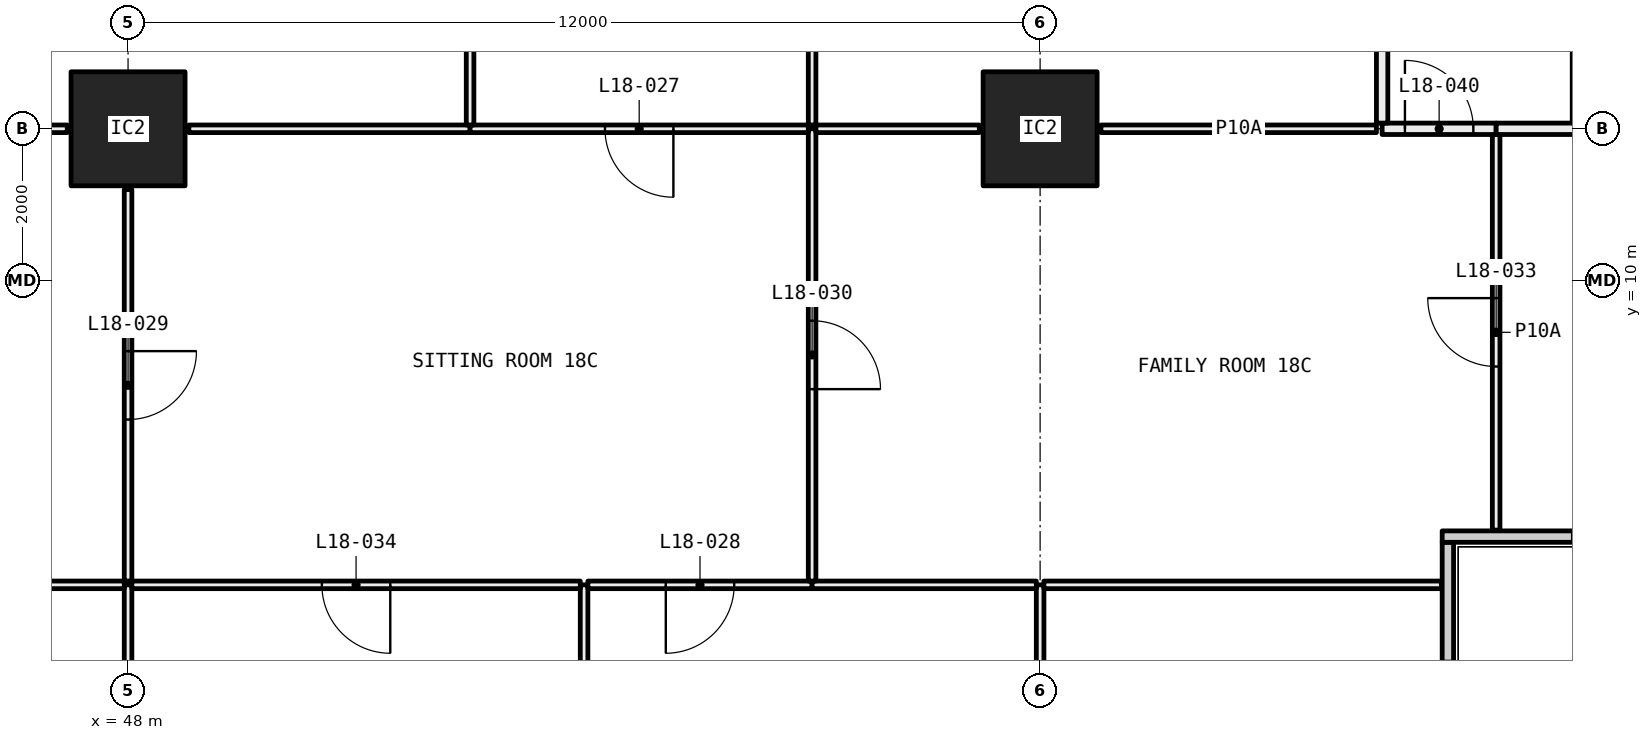
"""IFC4 building model, lengths in metres.
Left out: names, types, materials, properties, quantities, classifications, styles, units other than length and angle.
Written with IfcOpenShell. Run it as: python <this file> out.ifc"""

import sys

from ifc_helpers import new_model, si_unit, direction, frame, frame_2d, origin, origin_2d, place, context, subcontext, project, spatial, rectangle, hollow_rectangle, extrude, element, fill, save


model = new_model("IFC4")
c1 = context("Model", 3, precision=1e-05, world=origin(), true_north=direction((0.0, 1.0)))
c2 = subcontext(c1, "Body", "Model", "MODEL_VIEW")
j1 = project(units=[si_unit("LENGTHUNIT", "METRE"), si_unit("PLANEANGLEUNIT", "RADIAN")], contexts=[c1])
p1 = place(None, origin())
s1 = spatial("IfcSite", under=j1, at=p1, CompositionType="ELEMENT")
p2 = place(p1, origin())
s2 = spatial("IfcBuilding", under=s1, at=p2, CompositionType="ELEMENT")
p3 = place(p2, frame((0.0, 0.0, 74.85)))
s3 = spatial("IfcBuildingStorey", under=s2, at=p3, CompositionType="ELEMENT", Elevation=74.85)
for number, where, z_axis, x_axis in (
    (1, (48.0, 12.0, 0.0), (0.0, 0.0, 1.0), (1.0, 0.0, 0.0)),
    (2, (60.0, 12.0, 0.0), (0.0, 0.0, 1.0), (1.0, 0.0, 0.0)),
):
    element("IfcColumn", number, at=place(p3, frame(where, z_axis=z_axis, x_axis=x_axis)), inside=s3, PredefinedType="COLUMN", context=c2, shape_type="SweptSolid", body=[
        extrude(hollow_rectangle(XDim=1.5, YDim=1.5, WallThickness=0.065, at=origin_2d()), origin(), (0.0, 0.0, 1.0), 3.05),
    ])
p4 = place(p3, frame((65.365, 0.71, 0.0), z_axis=(0.0, 0.0, 1.0), x_axis=(0.0, 1.0, 0.0)))
e3 = element("IfcWall", 3, at=p4, inside=s3, PredefinedType="ELEMENTEDWALL", context=c2, shape_type="SweptSolid", body=[
    extrude(rectangle(XDim=5.85, YDim=0.15, at=frame_2d((2.925, 0.0))), origin(), (0.0, 0.0, 1.0), 3.05),
])
p5 = place(p4, frame((0.29, 0.0, 0.45)))
e4 = element("IfcOpeningElement", 4, at=p5, cuts=e3, PredefinedType="OPENING", context=c2, shape_type="SweptSolid", body=[
    extrude(rectangle(XDim=4.0, YDim=2.55, at=frame_2d((2.0, 1.275))), frame((0.0, 0.085, 0.0), z_axis=(0.0, -1.0, 0.0), x_axis=(1.0, 0.0, 0.0)), (0.0, 0.0, 1.0), 0.17),
])
p6 = place(p3, frame((65.29, 6.635, 0.0), z_axis=(0.0, 0.0, 1.0), x_axis=(1.0, 0.0, 0.0)))
e5 = element("IfcWall", 5, at=p6, inside=s3, PredefinedType="ELEMENTEDWALL", context=c2, shape_type="SweptSolid", body=[
    extrude(rectangle(XDim=6.15, YDim=0.15, at=frame_2d((3.075, 0.0))), origin(), (0.0, 0.0, 1.0), 3.05),
])
p7 = place(p6, frame((1.71, 0.0, 0.45)))
e6 = element("IfcOpeningElement", 6, at=p7, cuts=e5, PredefinedType="OPENING", context=c2, shape_type="SweptSolid", body=[
    extrude(rectangle(XDim=4.0, YDim=2.55, at=frame_2d((2.0, 1.275))), frame((0.0, 0.085, 0.0), z_axis=(0.0, -1.0, 0.0), x_axis=(1.0, 0.0, 0.0)), (0.0, 0.0, 1.0), 0.17),
])
p8 = place(p3, frame((48.0, 0.72, 0.0), z_axis=(0.0, 0.0, 1.0), x_axis=(0.0, 1.0, 0.0)))
e7 = element("IfcWall", 7, at=p8, inside=s3, PredefinedType="PARTITIONING", context=c2, shape_type="SweptSolid", body=[
    extrude(rectangle(XDim=5.28, YDim=0.1, at=frame_2d((2.64, 0.0))), origin(), (0.0, 0.0, 1.0), 2.45),
])
p9 = place(p3, frame((47.95, 6.0, 0.0), z_axis=(0.0, 0.0, 1.0), x_axis=(-1.0, 0.0, 0.0)))
e8 = element("IfcWall", 8, at=p9, inside=s3, PredefinedType="PARTITIONING", context=c2, shape_type="SweptSolid", body=[
    extrude(rectangle(XDim=8.875, YDim=0.1, at=frame_2d((4.438, 0.0))), origin(), (0.0, 0.0, 1.0), 2.45),
])
p10 = place(p9, frame((3.988, 0.0, 0.0)))
e9 = element("IfcOpeningElement", 9, at=p10, cuts=e8, PredefinedType="OPENING", context=c2, shape_type="SweptSolid", body=[
    extrude(rectangle(XDim=0.9, YDim=2.1, at=frame_2d((0.45, 1.05))), frame((0.0, 0.06, 0.0), z_axis=(0.0, -1.0, 0.0), x_axis=(1.0, 0.0, 0.0)), (0.0, 0.0, 1.0), 0.12),
])
p11 = place(p3, frame((54.0, 0.72, 0.0), z_axis=(0.0, 0.0, 1.0), x_axis=(0.0, 1.0, 0.0)))
e10 = element("IfcWall", 10, at=p11, inside=s3, PredefinedType="PARTITIONING", context=c2, shape_type="SweptSolid", body=[
    extrude(rectangle(XDim=5.28, YDim=0.1, at=frame_2d((2.64, 0.0))), origin(), (0.0, 0.0, 1.0), 3.05),
])
p12 = place(p3, frame((53.95, 6.0, 0.0), z_axis=(0.0, 0.0, 1.0), x_axis=(-1.0, 0.0, 0.0)))
e11 = element("IfcWall", 11, at=p12, inside=s3, PredefinedType="PARTITIONING", context=c2, shape_type="SweptSolid", body=[
    extrude(rectangle(XDim=5.9, YDim=0.1, at=frame_2d((2.95, 0.0))), origin(), (0.0, 0.0, 1.0), 2.45),
])
p13 = place(p12, frame((2.5, 0.0, 0.0)))
e12 = element("IfcOpeningElement", 12, at=p13, cuts=e11, PredefinedType="OPENING", context=c2, shape_type="SweptSolid", body=[
    extrude(rectangle(XDim=0.9, YDim=2.1, at=frame_2d((0.45, 1.05))), frame((0.0, 0.06, 0.0), z_axis=(0.0, -1.0, 0.0), x_axis=(1.0, 0.0, 0.0)), (0.0, 0.0, 1.0), 0.12),
])
p14 = place(p3, frame((60.0, 0.72, 0.0), z_axis=(0.0, 0.0, 1.0), x_axis=(0.0, 1.0, 0.0)))
e13 = element("IfcWall", 13, at=p14, inside=s3, PredefinedType="PARTITIONING", context=c2, shape_type="SweptSolid", body=[
    extrude(rectangle(XDim=5.28, YDim=0.1, at=frame_2d((2.64, 0.0))), origin(), (0.0, 0.0, 1.0), 2.45),
])
p15 = place(p14, frame((2.19, 0.0, 0.0)))
e14 = element("IfcOpeningElement", 14, at=p15, cuts=e13, PredefinedType="OPENING", context=c2, shape_type="SweptSolid", body=[
    extrude(rectangle(XDim=0.9, YDim=2.1, at=frame_2d((0.45, 1.05))), frame((0.0, 0.06, 0.0), z_axis=(0.0, -1.0, 0.0), x_axis=(1.0, 0.0, 0.0)), (0.0, 0.0, 1.0), 0.12),
])
p16 = place(p3, frame((57.0, 6.0, 0.0), z_axis=(0.0, 0.0, 1.0), x_axis=(-1.0, 0.0, 0.0)))
e15 = element("IfcWall", 15, at=p16, inside=s3, PredefinedType="PARTITIONING", context=c2, shape_type="SweptSolid", body=[
    extrude(rectangle(XDim=2.95, YDim=0.1, at=frame_2d((1.475, 0.0))), origin(), (0.0, 0.0, 1.0), 3.05),
])
p17 = place(p16, frame((1.025, 0.0, 0.0)))
e16 = element("IfcOpeningElement", 16, at=p17, cuts=e15, PredefinedType="OPENING", context=c2, shape_type="SweptSolid", body=[
    extrude(rectangle(XDim=0.9, YDim=2.1, at=frame_2d((0.45, 1.05))), frame((0.0, 0.06, 0.0), z_axis=(0.0, -1.0, 0.0), x_axis=(1.0, 0.0, 0.0)), (0.0, 0.0, 1.0), 0.12),
])
p18 = place(p3, frame((59.95, 6.0, 0.0), z_axis=(0.0, 0.0, 1.0), x_axis=(-1.0, 0.0, 0.0)))
e17 = element("IfcWall", 17, at=p18, inside=s3, PredefinedType="PARTITIONING", context=c2, shape_type="SweptSolid", body=[
    extrude(rectangle(XDim=2.95, YDim=0.1, at=frame_2d((1.475, 0.0))), origin(), (0.0, 0.0, 1.0), 2.45),
])
p19 = place(p3, frame((65.28, 6.0, 0.0), z_axis=(0.0, 0.0, 1.0), x_axis=(-1.0, 0.0, 0.0)))
e18 = element("IfcWall", 18, at=p19, inside=s3, PredefinedType="PARTITIONING", context=c2, shape_type="SweptSolid", body=[
    extrude(rectangle(XDim=5.23, YDim=0.1, at=frame_2d((2.615, 0.0))), origin(), (0.0, 0.0, 1.0), 2.45),
])
p20 = place(p3, frame((48.0, 6.05, 0.0), z_axis=(0.0, 0.0, 1.0), x_axis=(0.0, 1.0, 0.0)))
e19 = element("IfcWall", 19, at=p20, inside=s3, PredefinedType="PARTITIONING", context=c2, shape_type="SweptSolid", body=[
    extrude(rectangle(XDim=5.15, YDim=0.1, at=frame_2d((2.575, 0.0))), origin(), (0.0, 0.0, 1.0), 2.45),
])
p21 = place(p20, frame((2.125, 0.0, 0.0)))
e20 = element("IfcOpeningElement", 20, at=p21, cuts=e19, PredefinedType="OPENING", context=c2, shape_type="SweptSolid", body=[
    extrude(rectangle(XDim=0.9, YDim=2.1, at=frame_2d((0.45, 1.05))), frame((0.0, 0.06, 0.0), z_axis=(0.0, -1.0, 0.0), x_axis=(1.0, 0.0, 0.0)), (0.0, 0.0, 1.0), 0.12),
])
p22 = place(p3, frame((47.2, 12.0, 0.0), z_axis=(0.0, 0.0, 1.0), x_axis=(-1.0, 0.0, 0.0)))
e21 = element("IfcWall", 21, at=p22, inside=s3, PredefinedType="PARTITIONING", context=c2, shape_type="SweptSolid", body=[
    extrude(rectangle(XDim=2.2, YDim=0.1, at=frame_2d((1.1, 0.0))), origin(), (0.0, 0.0, 1.0), 2.45),
])
p23 = place(p3, frame((57.0, 6.05, 0.0), z_axis=(0.0, 0.0, 1.0), x_axis=(0.0, 1.0, 0.0)))
e22 = element("IfcWall", 22, at=p23, inside=s3, PredefinedType="PARTITIONING", context=c2, shape_type="SweptSolid", body=[
    extrude(rectangle(XDim=5.95, YDim=0.1, at=frame_2d((2.975, 0.0))), origin(), (0.0, 0.0, 1.0), 2.45),
])
p24 = place(p23, frame((2.525, 0.0, 0.0)))
e23 = element("IfcOpeningElement", 23, at=p24, cuts=e22, PredefinedType="OPENING", context=c2, shape_type="SweptSolid", body=[
    extrude(rectangle(XDim=0.9, YDim=2.1, at=frame_2d((0.45, 1.05))), frame((0.0, 0.06, 0.0), z_axis=(0.0, -1.0, 0.0), x_axis=(1.0, 0.0, 0.0)), (0.0, 0.0, 1.0), 0.12),
])
p25 = place(p3, frame((52.5, 12.0, 0.0), z_axis=(0.0, 0.0, 1.0), x_axis=(-1.0, 0.0, 0.0)))
e24 = element("IfcWall", 24, at=p25, inside=s3, PredefinedType="PARTITIONING", context=c2, shape_type="SweptSolid", body=[
    extrude(rectangle(XDim=3.7, YDim=0.1, at=frame_2d((1.85, 0.0))), origin(), (0.0, 0.0, 1.0), 2.45),
])
p26 = place(p3, frame((56.95, 12.0, 0.0), z_axis=(0.0, 0.0, 1.0), x_axis=(-1.0, 0.0, 0.0)))
e25 = element("IfcWall", 25, at=p26, inside=s3, PredefinedType="PARTITIONING", context=c2, shape_type="SweptSolid", body=[
    extrude(rectangle(XDim=4.45, YDim=0.1, at=frame_2d((2.225, 0.0))), origin(), (0.0, 0.0, 1.0), 2.45),
])
p27 = place(p26, frame((1.775, 0.0, 0.0)))
e26 = element("IfcOpeningElement", 26, at=p27, cuts=e25, PredefinedType="OPENING", context=c2, shape_type="SweptSolid", body=[
    extrude(rectangle(XDim=0.9, YDim=2.1, at=frame_2d((0.45, 1.05))), frame((0.0, 0.06, 0.0), z_axis=(0.0, -1.0, 0.0), x_axis=(1.0, 0.0, 0.0)), (0.0, 0.0, 1.0), 0.12),
])
p28 = place(p3, frame((66.0, 6.72, 0.0), z_axis=(0.0, 0.0, 1.0), x_axis=(0.0, 1.0, 0.0)))
e27 = element("IfcWall", 27, at=p28, inside=s3, PredefinedType="PARTITIONING", context=c2, shape_type="SweptSolid", body=[
    extrude(rectangle(XDim=5.205, YDim=0.1, at=frame_2d((2.603, 0.0))), origin(), (0.0, 0.0, 1.0), 2.45),
])
p29 = place(p28, frame((2.153, 0.0, 0.0)))
e28 = element("IfcOpeningElement", 28, at=p29, cuts=e27, PredefinedType="OPENING", context=c2, shape_type="SweptSolid", body=[
    extrude(rectangle(XDim=0.9, YDim=2.1, at=frame_2d((0.45, 1.05))), frame((0.0, 0.06, 0.0), z_axis=(0.0, -1.0, 0.0), x_axis=(1.0, 0.0, 0.0)), (0.0, 0.0, 1.0), 0.12),
])
p30 = place(p3, frame((59.2, 12.0, 0.0), z_axis=(0.0, 0.0, 1.0), x_axis=(-1.0, 0.0, 0.0)))
e29 = element("IfcWall", 29, at=p30, inside=s3, PredefinedType="PARTITIONING", context=c2, shape_type="SweptSolid", body=[
    extrude(rectangle(XDim=2.15, YDim=0.1, at=frame_2d((1.075, 0.0))), origin(), (0.0, 0.0, 1.0), 2.45),
])
p31 = place(p3, frame((64.425, 12.0, 0.0), z_axis=(0.0, 0.0, 1.0), x_axis=(-1.0, 0.0, 0.0)))
e30 = element("IfcWall", 30, at=p31, inside=s3, PredefinedType="PARTITIONING", context=c2, shape_type="SweptSolid", body=[
    extrude(rectangle(XDim=3.625, YDim=0.1, at=frame_2d((1.812, 0.0))), origin(), (0.0, 0.0, 1.0), 2.45),
])
p32 = place(p3, frame((66.0, 12.0, 0.0), z_axis=(0.0, 0.0, 1.0), x_axis=(-1.0, 0.0, 0.0)))
e31 = element("IfcWall", 31, at=p32, inside=s3, PredefinedType="PARTITIONING", context=c2, shape_type="SweptSolid", body=[
    extrude(rectangle(XDim=1.5, YDim=0.15, at=frame_2d((0.75, 0.0))), origin(), (0.0, 0.0, 1.0), 2.45),
])
p33 = place(p32, frame((0.3, 0.0, 0.0)))
e32 = element("IfcOpeningElement", 32, at=p33, cuts=e31, PredefinedType="OPENING", context=c2, shape_type="SweptSolid", body=[
    extrude(rectangle(XDim=0.9, YDim=2.1, at=frame_2d((0.45, 1.05))), frame((0.0, 0.085, 0.0), z_axis=(0.0, -1.0, 0.0), x_axis=(1.0, 0.0, 0.0)), (0.0, 0.0, 1.0), 0.17),
])
p34 = place(p3, frame((67.076, 12.0, 0.0), z_axis=(0.0, 0.0, 1.0), x_axis=(-1.0, 0.0, 0.0)))
e33 = element("IfcWall", 33, at=p34, inside=s3, PredefinedType="PARTITIONING", context=c2, shape_type="SweptSolid", body=[
    extrude(rectangle(XDim=1.076, YDim=0.15, at=frame_2d((0.538, 0.0))), origin(), (0.0, 0.0, 1.0), 2.45),
])
p35 = place(p3, frame((52.5, 12.05, 0.0), z_axis=(0.0, 0.0, 1.0), x_axis=(0.0, 1.0, 0.0)))
e34 = element("IfcWall", 34, at=p35, inside=s3, PredefinedType="PARTITIONING", context=c2, shape_type="SweptSolid", body=[
    extrude(rectangle(XDim=5.85, YDim=0.1, at=frame_2d((2.925, 0.0))), origin(), (0.0, 0.0, 1.0), 2.45),
])
p36 = place(p35, frame((2.475, 0.0, 0.0)))
e35 = element("IfcOpeningElement", 35, at=p36, cuts=e34, PredefinedType="OPENING", context=c2, shape_type="SweptSolid", body=[
    extrude(rectangle(XDim=0.9, YDim=2.1, at=frame_2d((0.45, 1.05))), frame((0.0, 0.06, 0.0), z_axis=(0.0, -1.0, 0.0), x_axis=(1.0, 0.0, 0.0)), (0.0, 0.0, 1.0), 0.12),
])
p37 = place(p3, frame((57.0, 12.05, 0.0), z_axis=(0.0, 0.0, 1.0), x_axis=(0.0, 1.0, 0.0)))
e36 = element("IfcWall", 36, at=p37, inside=s3, PredefinedType="PARTITIONING", context=c2, shape_type="SweptSolid", body=[
    extrude(rectangle(XDim=5.85, YDim=0.1, at=frame_2d((2.925, 0.0))), origin(), (0.0, 0.0, 1.0), 2.45),
])
p38 = place(p37, frame((2.475, 0.0, 0.0)))
e37 = element("IfcOpeningElement", 37, at=p38, cuts=e36, PredefinedType="OPENING", context=c2, shape_type="SweptSolid", body=[
    extrude(rectangle(XDim=0.9, YDim=2.1, at=frame_2d((0.45, 1.05))), frame((0.0, 0.06, 0.0), z_axis=(0.0, -1.0, 0.0), x_axis=(1.0, 0.0, 0.0)), (0.0, 0.0, 1.0), 0.12),
])
p39 = place(p3, frame((64.5, 12.075, 0.0), z_axis=(0.0, 0.0, 1.0), x_axis=(0.0, 1.0, 0.0)))
e38 = element("IfcWall", 38, at=p39, inside=s3, PredefinedType="PARTITIONING", context=c2, shape_type="SweptSolid", body=[
    extrude(rectangle(XDim=5.825, YDim=0.15, at=frame_2d((2.913, 0.0))), origin(), (0.0, 0.0, 1.0), 2.45),
])
p40 = place(p27, origin())
e39 = element("IfcDoor", 39, at=p40, inside=s3, OperationType="SINGLE_SWING_RIGHT", PredefinedType="DOOR", context=c2, shape_type="SweptSolid", body=[
    extrude(rectangle(XDim=0.9, YDim=2.1, at=frame_2d((0.45, 1.05))), frame((0.0, 0.025, 0.0), z_axis=(0.0, -1.0, 0.0), x_axis=(1.0, 0.0, 0.0)), (0.0, 0.0, 1.0), 0.05),
])
fill(e26, e39)
p41 = place(p17, origin())
e40 = element("IfcDoor", 40, at=p41, inside=s3, OperationType="SINGLE_SWING_LEFT", PredefinedType="DOOR", context=c2, shape_type="SweptSolid", body=[
    extrude(rectangle(XDim=0.9, YDim=2.1, at=frame_2d((0.45, 1.05))), frame((0.0, 0.025, 0.0), z_axis=(0.0, -1.0, 0.0), x_axis=(1.0, 0.0, 0.0)), (0.0, 0.0, 1.0), 0.05),
])
fill(e16, e40)
p42 = place(p21, frame((0.9, 0.0, 0.0), x_axis=(-1.0, 0.0, 0.0)))
e41 = element("IfcDoor", 41, at=p42, inside=s3, OperationType="SINGLE_SWING_RIGHT", PredefinedType="DOOR", context=c2, shape_type="SweptSolid", body=[
    extrude(rectangle(XDim=0.9, YDim=2.1, at=frame_2d((0.45, 1.05))), frame((0.0, 0.025, 0.0), z_axis=(0.0, -1.0, 0.0), x_axis=(1.0, 0.0, 0.0)), (0.0, 0.0, 1.0), 0.05),
])
fill(e20, e41)
p43 = place(p24, frame((0.9, 0.0, 0.0), x_axis=(-1.0, 0.0, 0.0)))
e42 = element("IfcDoor", 42, at=p43, inside=s3, OperationType="SINGLE_SWING_LEFT", PredefinedType="DOOR", context=c2, shape_type="SweptSolid", body=[
    extrude(rectangle(XDim=0.9, YDim=2.1, at=frame_2d((0.45, 1.05))), frame((0.0, 0.025, 0.0), z_axis=(0.0, -1.0, 0.0), x_axis=(1.0, 0.0, 0.0)), (0.0, 0.0, 1.0), 0.05),
])
fill(e23, e42)
p44 = place(p29, origin())
e43 = element("IfcDoor", 43, at=p44, inside=s3, OperationType="SINGLE_SWING_LEFT", PredefinedType="DOOR", context=c2, shape_type="SweptSolid", body=[
    extrude(rectangle(XDim=0.9, YDim=2.1, at=frame_2d((0.45, 1.05))), frame((0.0, 0.025, 0.0), z_axis=(0.0, -1.0, 0.0), x_axis=(1.0, 0.0, 0.0)), (0.0, 0.0, 1.0), 0.05),
])
fill(e28, e43)
p45 = place(p13, origin())
e44 = element("IfcDoor", 44, at=p45, inside=s3, OperationType="SINGLE_SWING_RIGHT", PredefinedType="DOOR", context=c2, shape_type="SweptSolid", body=[
    extrude(rectangle(XDim=0.9, YDim=2.1, at=frame_2d((0.45, 1.05))), frame((0.0, 0.025, 0.0), z_axis=(0.0, -1.0, 0.0), x_axis=(1.0, 0.0, 0.0)), (0.0, 0.0, 1.0), 0.05),
])
fill(e12, e44)
p46 = place(p33, frame((0.9, 0.0, 0.0), x_axis=(-1.0, 0.0, 0.0)))
e45 = element("IfcDoor", 45, at=p46, inside=s3, OperationType="SINGLE_SWING_RIGHT", PredefinedType="DOOR", context=c2, shape_type="SweptSolid", body=[
    extrude(rectangle(XDim=0.9, YDim=2.1, at=frame_2d((0.45, 1.05))), frame((0.0, 0.025, 0.0), z_axis=(0.0, -1.0, 0.0), x_axis=(1.0, 0.0, 0.0)), (0.0, 0.0, 1.0), 0.05),
])
fill(e32, e45)
save(model, sys.argv[1])
